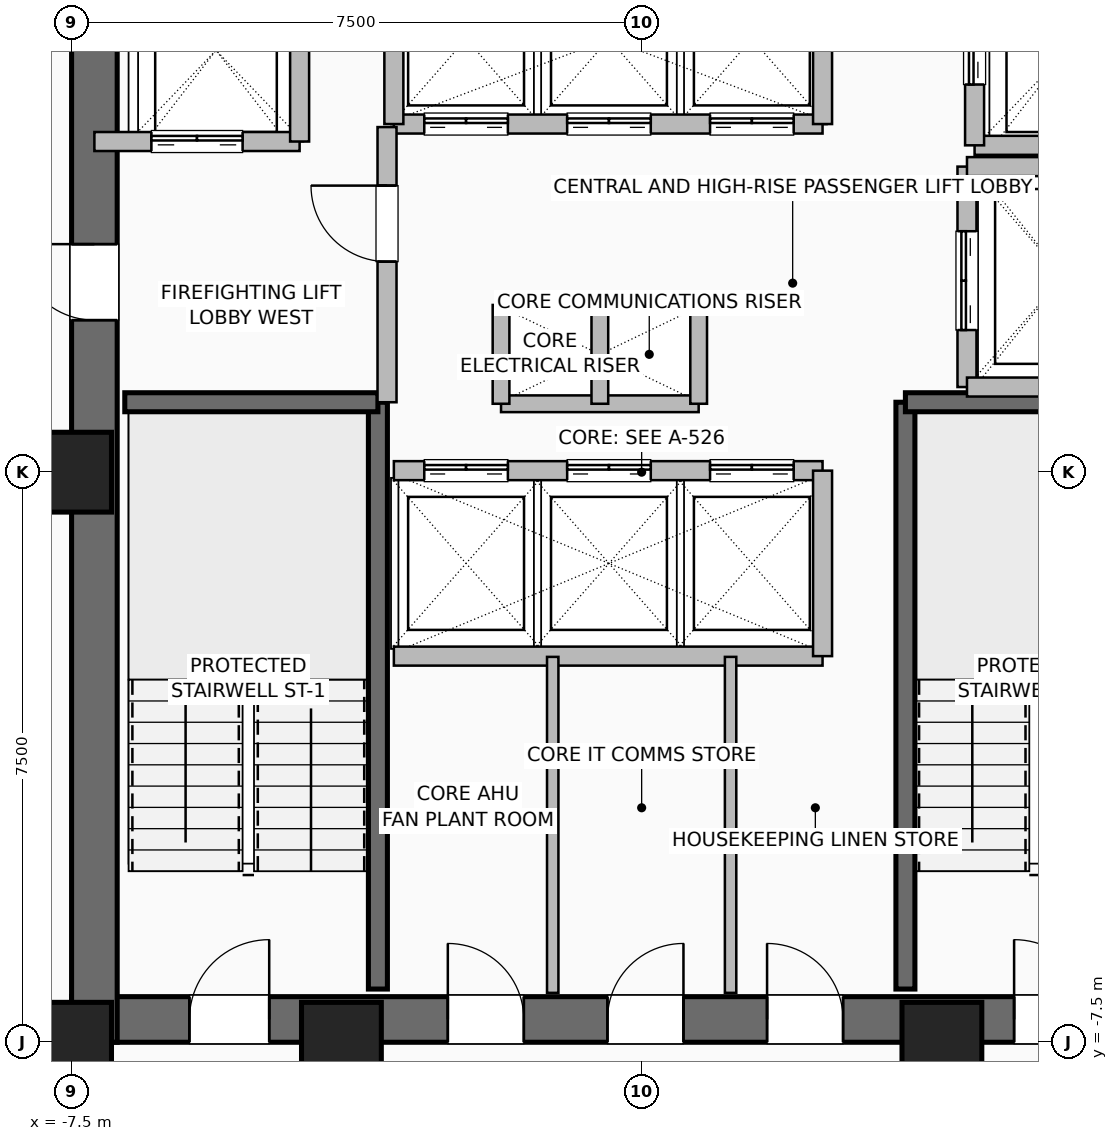
"""IFC4 building model, lengths in metres.
Left out: names, types, materials, properties, quantities, classifications, styles, units other than length and angle.
Written with IfcOpenShell. Run it as: python <this file> out.ifc"""

import sys

from ifc_helpers import new_model, si_unit, direction, frame, frame_2d, origin, origin_2d, place, context, subcontext, project, spatial, rectangle, hollow_rectangle, extrude, element, fill, save


model = new_model("IFC4")
c1 = context("Model", 3, precision=1e-05, world=origin(), true_north=direction((0.0, 1.0)))
c2 = subcontext(c1, "Body", "Model", "MODEL_VIEW")
j1 = project(units=[si_unit("LENGTHUNIT", "METRE"), si_unit("PLANEANGLEUNIT", "RADIAN")], contexts=[c1])
p1 = place(None, origin())
s1 = spatial("IfcSite", under=j1, at=p1, CompositionType="ELEMENT")
p2 = place(p1, origin())
s2 = spatial("IfcBuilding", under=s1, at=p2, CompositionType="ELEMENT")
p3 = place(p2, frame((0.0, 0.0, 101.2)))
s3 = spatial("IfcBuildingStorey", under=s2, at=p3, CompositionType="ELEMENT", Elevation=101.2)
for number, where, z_axis, x_axis in (
    (1, (-7.5, -7.5, 0.0), (0.0, 0.0, 1.0), (1.0, 0.0, 0.0)),
    (2, (-3.95, -7.5, 0.0), (0.0, 0.0, 1.0), (1.0, 0.0, 0.0)),
    (3, (3.95, -7.5, 0.0), (0.0, 0.0, 1.0), (1.0, 0.0, 0.0)),
    (4, (-7.5, 0.0, 0.0), (0.0, 0.0, 1.0), (1.0, 0.0, 0.0)),
):
    element("IfcColumn", number, at=place(p3, frame(where, z_axis=z_axis, x_axis=x_axis)), inside=s3, PredefinedType="COLUMN", context=c2, shape_type="SweptSolid", body=[
        extrude(hollow_rectangle(XDim=1.05, YDim=1.05, WallThickness=0.05, at=origin_2d()), origin(), (0.0, 0.0, 1.0), 3.6),
    ])
p4 = place(p3, frame((-7.5, -7.2, 0.0), z_axis=(0.0, 0.0, 1.0), x_axis=(1.0, 0.0, 0.0)))
e5 = element("IfcWall", 5, at=p4, inside=s3, PredefinedType="SHEAR", context=c2, shape_type="SweptSolid", body=[
    extrude(rectangle(XDim=15.0, YDim=0.6, at=frame_2d((7.5, 0.0))), origin(), (0.0, 0.0, 1.0), 3.36),
])
p5 = place(p4, frame((1.55, 0.0, 0.0)))
e6 = element("IfcOpeningElement", 6, at=p5, cuts=e5, PredefinedType="OPENING", context=c2, shape_type="SweptSolid", body=[
    extrude(rectangle(XDim=1.05, YDim=2.08, at=frame_2d((0.525, 1.04))), frame((0.0, 0.31, 0.0), z_axis=(0.0, -1.0, 0.0), x_axis=(1.0, 0.0, 0.0)), (0.0, 0.0, 1.0), 0.62),
])
p6 = place(p4, frame((12.4, 0.0, 0.0)))
e7 = element("IfcOpeningElement", 7, at=p6, cuts=e5, PredefinedType="OPENING", context=c2, shape_type="SweptSolid", body=[
    extrude(rectangle(XDim=1.05, YDim=2.08, at=frame_2d((0.525, 1.04))), frame((0.0, 0.31, 0.0), z_axis=(0.0, -1.0, 0.0), x_axis=(1.0, 0.0, 0.0)), (0.0, 0.0, 1.0), 0.62),
])
p7 = place(p4, frame((4.95, 0.0, 0.0)))
e8 = element("IfcOpeningElement", 8, at=p7, cuts=e5, PredefinedType="OPENING", context=c2, shape_type="SweptSolid", body=[
    extrude(rectangle(XDim=1.0, YDim=2.08, at=frame_2d((0.5, 1.04))), frame((0.0, 0.31, 0.0), z_axis=(0.0, -1.0, 0.0), x_axis=(1.0, 0.0, 0.0)), (0.0, 0.0, 1.0), 0.62),
])
p8 = place(p4, frame((7.05, 0.0, 0.0)))
e9 = element("IfcOpeningElement", 9, at=p8, cuts=e5, PredefinedType="OPENING", context=c2, shape_type="SweptSolid", body=[
    extrude(rectangle(XDim=1.0, YDim=2.08, at=frame_2d((0.5, 1.04))), frame((0.0, 0.31, 0.0), z_axis=(0.0, -1.0, 0.0), x_axis=(1.0, 0.0, 0.0)), (0.0, 0.0, 1.0), 0.62),
])
p9 = place(p4, frame((9.15, 0.0, 0.0)))
e10 = element("IfcOpeningElement", 10, at=p9, cuts=e5, PredefinedType="OPENING", context=c2, shape_type="SweptSolid", body=[
    extrude(rectangle(XDim=1.0, YDim=2.08, at=frame_2d((0.5, 1.04))), frame((0.0, 0.31, 0.0), z_axis=(0.0, -1.0, 0.0), x_axis=(1.0, 0.0, 0.0)), (0.0, 0.0, 1.0), 0.62),
])
p10 = place(p3, frame((-7.2, -7.5, 0.0), z_axis=(0.0, 0.0, 1.0), x_axis=(0.0, 1.0, 0.0)))
e11 = element("IfcWall", 11, at=p10, inside=s3, PredefinedType="SHEAR", context=c2, shape_type="SweptSolid", body=[
    extrude(rectangle(XDim=15.0, YDim=0.6, at=frame_2d((7.5, 0.0))), origin(), (0.0, 0.0, 1.0), 3.36),
])
p11 = place(p10, frame((9.5, 0.0, 0.0)))
e12 = element("IfcOpeningElement", 12, at=p11, cuts=e11, PredefinedType="OPENING", context=c2, shape_type="SweptSolid", body=[
    extrude(rectangle(XDim=1.0, YDim=2.08, at=frame_2d((0.5, 1.04))), frame((0.0, 0.31, 0.0), z_axis=(0.0, -1.0, 0.0), x_axis=(1.0, 0.0, 0.0)), (0.0, 0.0, 1.0), 0.62),
])
p12 = place(p3, frame((-3.47, -6.8, 0.0), z_axis=(0.0, 0.0, 1.0), x_axis=(0.0, 1.0, 0.0)))
e13 = element("IfcWall", 13, at=p12, inside=s3, PredefinedType="SHEAR", context=c2, shape_type="SweptSolid", body=[
    extrude(rectangle(XDim=7.72, YDim=0.25, at=frame_2d((3.86, 0.0))), origin(), (0.0, 0.0, 1.0), 3.36),
])
p13 = place(p3, frame((-6.8, 0.92, 0.0), z_axis=(0.0, 0.0, 1.0), x_axis=(1.0, 0.0, 0.0)))
e14 = element("IfcWall", 14, at=p13, inside=s3, PredefinedType="SHEAR", context=c2, shape_type="SweptSolid", body=[
    extrude(rectangle(XDim=3.33, YDim=0.25, at=frame_2d((1.665, 0.0))), origin(), (0.0, 0.0, 1.0), 3.36),
])
p14 = place(p3, frame((3.47, -6.8, 0.0), z_axis=(0.0, 0.0, 1.0), x_axis=(0.0, 1.0, 0.0)))
e15 = element("IfcWall", 15, at=p14, inside=s3, PredefinedType="SHEAR", context=c2, shape_type="SweptSolid", body=[
    extrude(rectangle(XDim=7.72, YDim=0.25, at=frame_2d((3.86, 0.0))), origin(), (0.0, 0.0, 1.0), 3.36),
])
p15 = place(p3, frame((3.47, 0.92, 0.0), z_axis=(0.0, 0.0, 1.0), x_axis=(1.0, 0.0, 0.0)))
e16 = element("IfcWall", 16, at=p15, inside=s3, PredefinedType="SHEAR", context=c2, shape_type="SweptSolid", body=[
    extrude(rectangle(XDim=3.33, YDim=0.25, at=frame_2d((1.665, 0.0))), origin(), (0.0, 0.0, 1.0), 3.36),
])
for number, where, z_axis, x_axis in (
    (17, (-1.85, 2.2, 0.0), (0.0, 0.0, 1.0), (1.0, 0.0, 0.0)),
    (18, (-1.85, 0.9, 0.0), (0.0, 0.0, 1.0), (1.0, 0.0, 0.0)),
):
    element("IfcWall", number, at=place(p3, frame(where, z_axis=z_axis, x_axis=x_axis)), inside=s3, PredefinedType="PARTITIONING", context=c2, shape_type="SweptSolid", body=[
        extrude(rectangle(XDim=2.6, YDim=0.22, at=frame_2d((1.3, 0.0))), origin(), (0.0, 0.0, 1.0), 3.36),
    ])
for number, where, z_axis, x_axis in (
    (19, (-0.55, 0.9, 0.0), (0.0, 0.0, 1.0), (0.0, 1.0, 0.0)),
    (20, (0.75, 0.9, 0.0), (0.0, 0.0, 1.0), (0.0, 1.0, 0.0)),
    (21, (-1.85, 0.9, 0.0), (0.0, 0.0, 1.0), (0.0, 1.0, 0.0)),
):
    element("IfcWall", number, at=place(p3, frame(where, z_axis=z_axis, x_axis=x_axis)), inside=s3, PredefinedType="PARTITIONING", context=c2, shape_type="SweptSolid", body=[
        extrude(rectangle(XDim=1.3, YDim=0.22, at=frame_2d((0.65, 0.0))), origin(), (0.0, 0.0, 1.0), 3.36),
    ])
p16 = place(p3, frame((-3.26, 0.02, 0.0), z_axis=(0.0, 0.0, 1.0), x_axis=(1.0, 0.0, 0.0)))
e22 = element("IfcWall", 22, at=p16, inside=s3, PredefinedType="SHEAR", context=c2, shape_type="SweptSolid", body=[
    extrude(rectangle(XDim=5.64, YDim=0.25, at=frame_2d((2.82, 0.0))), origin(), (0.0, 0.0, 1.0), 3.36),
])
p17 = place(p16, frame((0.4, 0.0, 0.0)))
e23 = element("IfcOpeningElement", 23, at=p17, cuts=e22, PredefinedType="OPENING", context=c2, shape_type="SweptSolid", body=[
    extrude(rectangle(XDim=1.1, YDim=2.2, at=frame_2d((0.55, 1.1))), frame((0.0, 0.135, 0.0), z_axis=(0.0, -1.0, 0.0), x_axis=(1.0, 0.0, 0.0)), (0.0, 0.0, 1.0), 0.27),
])
p18 = place(p16, frame((2.28, 0.0, 0.0)))
e24 = element("IfcOpeningElement", 24, at=p18, cuts=e22, PredefinedType="OPENING", context=c2, shape_type="SweptSolid", body=[
    extrude(rectangle(XDim=1.1, YDim=2.2, at=frame_2d((0.55, 1.1))), frame((0.0, 0.135, 0.0), z_axis=(0.0, -1.0, 0.0), x_axis=(1.0, 0.0, 0.0)), (0.0, 0.0, 1.0), 0.27),
])
p19 = place(p16, frame((4.16, 0.0, 0.0)))
e25 = element("IfcOpeningElement", 25, at=p19, cuts=e22, PredefinedType="OPENING", context=c2, shape_type="SweptSolid", body=[
    extrude(rectangle(XDim=1.1, YDim=2.2, at=frame_2d((0.55, 1.1))), frame((0.0, 0.135, 0.0), z_axis=(0.0, -1.0, 0.0), x_axis=(1.0, 0.0, 0.0)), (0.0, 0.0, 1.0), 0.27),
])
p20 = place(p3, frame((-3.26, -2.42, 0.0), z_axis=(0.0, 0.0, 1.0), x_axis=(1.0, 0.0, 0.0)))
e26 = element("IfcWall", 26, at=p20, inside=s3, PredefinedType="SHEAR", context=c2, shape_type="SweptSolid", body=[
    extrude(rectangle(XDim=5.64, YDim=0.25, at=frame_2d((2.82, 0.0))), origin(), (0.0, 0.0, 1.0), 3.36),
])
p21 = place(p3, frame((2.38, -2.42, 0.0), z_axis=(0.0, 0.0, 1.0), x_axis=(0.0, 1.0, 0.0)))
e27 = element("IfcWall", 27, at=p21, inside=s3, PredefinedType="SHEAR", context=c2, shape_type="SweptSolid", body=[
    extrude(rectangle(XDim=2.44, YDim=0.25, at=frame_2d((1.22, 0.0))), origin(), (0.0, 0.0, 1.0), 3.36),
])
p22 = place(p3, frame((-3.26, 4.58, 0.0), z_axis=(0.0, 0.0, 1.0), x_axis=(1.0, 0.0, 0.0)))
e28 = element("IfcWall", 28, at=p22, inside=s3, PredefinedType="SHEAR", context=c2, shape_type="SweptSolid", body=[
    extrude(rectangle(XDim=5.64, YDim=0.25, at=frame_2d((2.82, 0.0))), origin(), (0.0, 0.0, 1.0), 3.36),
])
p23 = place(p22, frame((0.4, 0.0, 0.0)))
e29 = element("IfcOpeningElement", 29, at=p23, cuts=e28, PredefinedType="OPENING", context=c2, shape_type="SweptSolid", body=[
    extrude(rectangle(XDim=1.1, YDim=2.2, at=frame_2d((0.55, 1.1))), frame((0.0, 0.135, 0.0), z_axis=(0.0, -1.0, 0.0), x_axis=(1.0, 0.0, 0.0)), (0.0, 0.0, 1.0), 0.27),
])
p24 = place(p22, frame((2.28, 0.0, 0.0)))
e30 = element("IfcOpeningElement", 30, at=p24, cuts=e28, PredefinedType="OPENING", context=c2, shape_type="SweptSolid", body=[
    extrude(rectangle(XDim=1.1, YDim=2.2, at=frame_2d((0.55, 1.1))), frame((0.0, 0.135, 0.0), z_axis=(0.0, -1.0, 0.0), x_axis=(1.0, 0.0, 0.0)), (0.0, 0.0, 1.0), 0.27),
])
p25 = place(p22, frame((4.16, 0.0, 0.0)))
e31 = element("IfcOpeningElement", 31, at=p25, cuts=e28, PredefinedType="OPENING", context=c2, shape_type="SweptSolid", body=[
    extrude(rectangle(XDim=1.1, YDim=2.2, at=frame_2d((0.55, 1.1))), frame((0.0, 0.135, 0.0), z_axis=(0.0, -1.0, 0.0), x_axis=(1.0, 0.0, 0.0)), (0.0, 0.0, 1.0), 0.27),
])
for number, where, z_axis, x_axis in (
    (32, (-3.26, 4.58, 0.0), (0.0, 0.0, 1.0), (0.0, 1.0, 0.0)),
    (33, (2.38, 4.58, 0.0), (0.0, 0.0, 1.0), (0.0, 1.0, 0.0)),
):
    element("IfcWall", number, at=place(p3, frame(where, z_axis=z_axis, x_axis=x_axis)), inside=s3, PredefinedType="SHEAR", context=c2, shape_type="SweptSolid", body=[
        extrude(rectangle(XDim=2.22, YDim=0.25, at=frame_2d((1.11, 0.0))), origin(), (0.0, 0.0, 1.0), 3.36),
    ])
p26 = place(p3, frame((-7.2, 4.35, 0.0), z_axis=(0.0, 0.0, 1.0), x_axis=(1.0, 0.0, 0.0)))
e34 = element("IfcWall", 34, at=p26, inside=s3, PredefinedType="SHEAR", context=c2, shape_type="SweptSolid", body=[
    extrude(rectangle(XDim=2.7, YDim=0.25, at=frame_2d((1.35, 0.0))), origin(), (0.0, 0.0, 1.0), 3.36),
])
p27 = place(p26, frame((0.75, 0.0, 0.0)))
e35 = element("IfcOpeningElement", 35, at=p27, cuts=e34, PredefinedType="OPENING", context=c2, shape_type="SweptSolid", body=[
    extrude(rectangle(XDim=1.2, YDim=2.2, at=frame_2d((0.6, 1.1))), frame((0.0, 0.135, 0.0), z_axis=(0.0, -1.0, 0.0), x_axis=(1.0, 0.0, 0.0)), (0.0, 0.0, 1.0), 0.27),
])
p28 = place(p3, frame((-4.5, 4.35, 0.0), z_axis=(0.0, 0.0, 1.0), x_axis=(0.0, 1.0, 0.0)))
e36 = element("IfcWall", 36, at=p28, inside=s3, PredefinedType="SHEAR", context=c2, shape_type="SweptSolid", body=[
    extrude(rectangle(XDim=2.85, YDim=0.25, at=frame_2d((1.425, 0.0))), origin(), (0.0, 0.0, 1.0), 3.36),
])
p29 = place(p3, frame((4.38, 4.3, 0.0), z_axis=(0.0, 0.0, 1.0), x_axis=(1.0, 0.0, 0.0)))
e37 = element("IfcWall", 37, at=p29, inside=s3, PredefinedType="SHEAR", context=c2, shape_type="SweptSolid", body=[
    extrude(rectangle(XDim=2.42, YDim=0.25, at=frame_2d((1.21, 0.0))), origin(), (0.0, 0.0, 1.0), 3.36),
])
p30 = place(p3, frame((4.38, 4.3, 0.0), z_axis=(0.0, 0.0, 1.0), x_axis=(0.0, 1.0, 0.0)))
e38 = element("IfcWall", 38, at=p30, inside=s3, PredefinedType="SHEAR", context=c2, shape_type="SweptSolid", body=[
    extrude(rectangle(XDim=2.5, YDim=0.25, at=frame_2d((1.25, 0.0))), origin(), (0.0, 0.0, 1.0), 3.36),
])
p31 = place(p30, frame((0.8, 0.0, 0.0)))
e39 = element("IfcOpeningElement", 39, at=p31, cuts=e38, PredefinedType="OPENING", context=c2, shape_type="SweptSolid", body=[
    extrude(rectangle(XDim=1.2, YDim=2.2, at=frame_2d((0.6, 1.1))), frame((0.0, 0.135, 0.0), z_axis=(0.0, -1.0, 0.0), x_axis=(1.0, 0.0, 0.0)), (0.0, 0.0, 1.0), 0.27),
])
p32 = place(p3, frame((4.28, 1.12, 0.0), z_axis=(0.0, 0.0, 1.0), x_axis=(0.0, 1.0, 0.0)))
e40 = element("IfcWall", 40, at=p32, inside=s3, PredefinedType="SHEAR", context=c2, shape_type="SweptSolid", body=[
    extrude(rectangle(XDim=2.9, YDim=0.25, at=frame_2d((1.45, 0.0))), origin(), (0.0, 0.0, 1.0), 3.36),
])
p33 = place(p32, frame((0.75, 0.0, 0.0)))
e41 = element("IfcOpeningElement", 41, at=p33, cuts=e40, PredefinedType="OPENING", context=c2, shape_type="SweptSolid", body=[
    extrude(rectangle(XDim=1.3, YDim=2.3, at=frame_2d((0.65, 1.15))), frame((0.0, 0.135, 0.0), z_axis=(0.0, -1.0, 0.0), x_axis=(1.0, 0.0, 0.0)), (0.0, 0.0, 1.0), 0.27),
])
for number, where, z_axis, x_axis in (
    (42, (4.28, 1.12, 0.0), (0.0, 0.0, 1.0), (1.0, 0.0, 0.0)),
    (43, (4.28, 4.02, 0.0), (0.0, 0.0, 1.0), (1.0, 0.0, 0.0)),
):
    element("IfcWall", number, at=place(p3, frame(where, z_axis=z_axis, x_axis=x_axis)), inside=s3, PredefinedType="SHEAR", context=c2, shape_type="SweptSolid", body=[
        extrude(rectangle(XDim=2.52, YDim=0.25, at=frame_2d((1.26, 0.0))), origin(), (0.0, 0.0, 1.0), 3.36),
    ])
p34 = place(p3, frame((-3.35, 0.92, 0.0), z_axis=(0.0, 0.0, 1.0), x_axis=(0.0, 1.0, 0.0)))
e44 = element("IfcWall", 44, at=p34, inside=s3, PredefinedType="SHEAR", context=c2, shape_type="SweptSolid", body=[
    extrude(rectangle(XDim=3.62, YDim=0.25, at=frame_2d((1.81, 0.0))), origin(), (0.0, 0.0, 1.0), 3.36),
])
p35 = place(p34, frame((1.85, 0.0, 0.0)))
e45 = element("IfcOpeningElement", 45, at=p35, cuts=e44, PredefinedType="OPENING", context=c2, shape_type="SweptSolid", body=[
    extrude(rectangle(XDim=1.0, YDim=2.08, at=frame_2d((0.5, 1.04))), frame((0.0, 0.135, 0.0), z_axis=(0.0, -1.0, 0.0), x_axis=(1.0, 0.0, 0.0)), (0.0, 0.0, 1.0), 0.27),
])
for number, where, z_axis, x_axis in (
    (46, (-1.17, -6.85, 0.0), (0.0, 0.0, 1.0), (0.0, 1.0, 0.0)),
    (47, (1.17, -6.85, 0.0), (0.0, 0.0, 1.0), (0.0, 1.0, 0.0)),
):
    element("IfcWall", number, at=place(p3, frame(where, z_axis=z_axis, x_axis=x_axis)), inside=s3, PredefinedType="PARTITIONING", context=c2, shape_type="SweptSolid", body=[
        extrude(rectangle(XDim=4.42, YDim=0.15, at=frame_2d((2.21, 0.0))), origin(), (0.0, 0.0, 1.0), 3.36),
    ])
p36 = place(p5, origin())
e48 = element("IfcDoor", 48, at=p36, inside=s3, OperationType="SINGLE_SWING_RIGHT", PredefinedType="DOOR", context=c2, shape_type="SweptSolid", body=[
    extrude(rectangle(XDim=1.05, YDim=2.08, at=frame_2d((0.525, 1.04))), frame((0.0, 0.025, 0.0), z_axis=(0.0, -1.0, 0.0), x_axis=(1.0, 0.0, 0.0)), (0.0, 0.0, 1.0), 0.05),
])
fill(e6, e48)
p37 = place(p6, origin())
e49 = element("IfcDoor", 49, at=p37, inside=s3, OperationType="SINGLE_SWING_LEFT", PredefinedType="DOOR", context=c2, shape_type="SweptSolid", body=[
    extrude(rectangle(XDim=1.05, YDim=2.08, at=frame_2d((0.525, 1.04))), frame((0.0, 0.025, 0.0), z_axis=(0.0, -1.0, 0.0), x_axis=(1.0, 0.0, 0.0)), (0.0, 0.0, 1.0), 0.05),
])
fill(e7, e49)
p38 = place(p11, origin())
e50 = element("IfcDoor", 50, at=p38, inside=s3, OperationType="SINGLE_SWING_RIGHT", PredefinedType="DOOR", context=c2, shape_type="SweptSolid", body=[
    extrude(rectangle(XDim=1.0, YDim=2.08, at=frame_2d((0.5, 1.04))), frame((0.0, 0.025, 0.0), z_axis=(0.0, -1.0, 0.0), x_axis=(1.0, 0.0, 0.0)), (0.0, 0.0, 1.0), 0.05),
])
fill(e12, e50)
p39 = place(p7, origin())
e51 = element("IfcDoor", 51, at=p39, inside=s3, OperationType="SINGLE_SWING_LEFT", PredefinedType="DOOR", context=c2, shape_type="SweptSolid", body=[
    extrude(rectangle(XDim=1.0, YDim=2.08, at=frame_2d((0.5, 1.04))), frame((0.0, 0.025, 0.0), z_axis=(0.0, -1.0, 0.0), x_axis=(1.0, 0.0, 0.0)), (0.0, 0.0, 1.0), 0.05),
])
fill(e8, e51)
p40 = place(p8, origin())
e52 = element("IfcDoor", 52, at=p40, inside=s3, OperationType="SINGLE_SWING_RIGHT", PredefinedType="DOOR", context=c2, shape_type="SweptSolid", body=[
    extrude(rectangle(XDim=1.0, YDim=2.08, at=frame_2d((0.5, 1.04))), frame((0.0, 0.025, 0.0), z_axis=(0.0, -1.0, 0.0), x_axis=(1.0, 0.0, 0.0)), (0.0, 0.0, 1.0), 0.05),
])
fill(e9, e52)
p41 = place(p9, origin())
e53 = element("IfcDoor", 53, at=p41, inside=s3, OperationType="SINGLE_SWING_LEFT", PredefinedType="DOOR", context=c2, shape_type="SweptSolid", body=[
    extrude(rectangle(XDim=1.0, YDim=2.08, at=frame_2d((0.5, 1.04))), frame((0.0, 0.025, 0.0), z_axis=(0.0, -1.0, 0.0), x_axis=(1.0, 0.0, 0.0)), (0.0, 0.0, 1.0), 0.05),
])
fill(e10, e53)
p42 = place(p17, origin())
e54 = element("IfcDoor", 54, at=p42, inside=s3, OperationType="DOUBLE_DOOR_SLIDING", PredefinedType="DOOR", context=c2, shape_type="SweptSolid", body=[
    extrude(rectangle(XDim=1.1, YDim=2.2, at=frame_2d((0.55, 1.1))), frame((0.0, 0.025, 0.0), z_axis=(0.0, -1.0, 0.0), x_axis=(1.0, 0.0, 0.0)), (0.0, 0.0, 1.0), 0.05),
])
fill(e23, e54)
p43 = place(p18, origin())
e55 = element("IfcDoor", 55, at=p43, inside=s3, OperationType="DOUBLE_DOOR_SLIDING", PredefinedType="DOOR", context=c2, shape_type="SweptSolid", body=[
    extrude(rectangle(XDim=1.1, YDim=2.2, at=frame_2d((0.55, 1.1))), frame((0.0, 0.025, 0.0), z_axis=(0.0, -1.0, 0.0), x_axis=(1.0, 0.0, 0.0)), (0.0, 0.0, 1.0), 0.05),
])
fill(e24, e55)
p44 = place(p19, origin())
e56 = element("IfcDoor", 56, at=p44, inside=s3, OperationType="DOUBLE_DOOR_SLIDING", PredefinedType="DOOR", context=c2, shape_type="SweptSolid", body=[
    extrude(rectangle(XDim=1.1, YDim=2.2, at=frame_2d((0.55, 1.1))), frame((0.0, 0.025, 0.0), z_axis=(0.0, -1.0, 0.0), x_axis=(1.0, 0.0, 0.0)), (0.0, 0.0, 1.0), 0.05),
])
fill(e25, e56)
p45 = place(p23, origin())
e57 = element("IfcDoor", 57, at=p45, inside=s3, OperationType="DOUBLE_DOOR_SLIDING", PredefinedType="DOOR", context=c2, shape_type="SweptSolid", body=[
    extrude(rectangle(XDim=1.1, YDim=2.2, at=frame_2d((0.55, 1.1))), frame((0.0, 0.025, 0.0), z_axis=(0.0, -1.0, 0.0), x_axis=(1.0, 0.0, 0.0)), (0.0, 0.0, 1.0), 0.05),
])
fill(e29, e57)
p46 = place(p24, origin())
e58 = element("IfcDoor", 58, at=p46, inside=s3, OperationType="DOUBLE_DOOR_SLIDING", PredefinedType="DOOR", context=c2, shape_type="SweptSolid", body=[
    extrude(rectangle(XDim=1.1, YDim=2.2, at=frame_2d((0.55, 1.1))), frame((0.0, 0.025, 0.0), z_axis=(0.0, -1.0, 0.0), x_axis=(1.0, 0.0, 0.0)), (0.0, 0.0, 1.0), 0.05),
])
fill(e30, e58)
p47 = place(p25, origin())
e59 = element("IfcDoor", 59, at=p47, inside=s3, OperationType="DOUBLE_DOOR_SLIDING", PredefinedType="DOOR", context=c2, shape_type="SweptSolid", body=[
    extrude(rectangle(XDim=1.1, YDim=2.2, at=frame_2d((0.55, 1.1))), frame((0.0, 0.025, 0.0), z_axis=(0.0, -1.0, 0.0), x_axis=(1.0, 0.0, 0.0)), (0.0, 0.0, 1.0), 0.05),
])
fill(e31, e59)
p48 = place(p27, origin())
e60 = element("IfcDoor", 60, at=p48, inside=s3, OperationType="DOUBLE_DOOR_SLIDING", PredefinedType="DOOR", context=c2, shape_type="SweptSolid", body=[
    extrude(rectangle(XDim=1.2, YDim=2.2, at=frame_2d((0.6, 1.1))), frame((0.0, 0.025, 0.0), z_axis=(0.0, -1.0, 0.0), x_axis=(1.0, 0.0, 0.0)), (0.0, 0.0, 1.0), 0.05),
])
fill(e35, e60)
p49 = place(p31, origin())
e61 = element("IfcDoor", 61, at=p49, inside=s3, OperationType="DOUBLE_DOOR_SLIDING", PredefinedType="DOOR", context=c2, shape_type="SweptSolid", body=[
    extrude(rectangle(XDim=1.2, YDim=2.2, at=frame_2d((0.6, 1.1))), frame((0.0, 0.025, 0.0), z_axis=(0.0, -1.0, 0.0), x_axis=(1.0, 0.0, 0.0)), (0.0, 0.0, 1.0), 0.05),
])
fill(e39, e61)
p50 = place(p33, origin())
e62 = element("IfcDoor", 62, at=p50, inside=s3, OperationType="DOUBLE_DOOR_SLIDING", PredefinedType="DOOR", context=c2, shape_type="SweptSolid", body=[
    extrude(rectangle(XDim=1.3, YDim=2.3, at=frame_2d((0.65, 1.15))), frame((0.0, 0.025, 0.0), z_axis=(0.0, -1.0, 0.0), x_axis=(1.0, 0.0, 0.0)), (0.0, 0.0, 1.0), 0.05),
])
fill(e41, e62)
p51 = place(p35, origin())
e63 = element("IfcDoor", 63, at=p51, inside=s3, OperationType="SINGLE_SWING_RIGHT", PredefinedType="DOOR", context=c2, shape_type="SweptSolid", body=[
    extrude(rectangle(XDim=1.0, YDim=2.08, at=frame_2d((0.5, 1.04))), frame((0.0, 0.025, 0.0), z_axis=(0.0, -1.0, 0.0), x_axis=(1.0, 0.0, 0.0)), (0.0, 0.0, 1.0), 0.05),
])
fill(e45, e63)
save(model, sys.argv[1])
